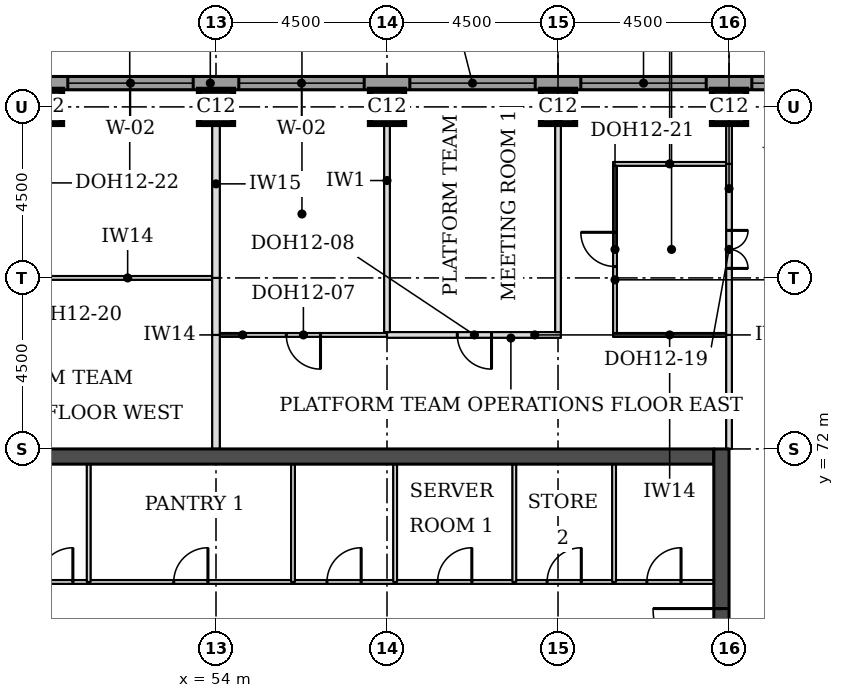
"""IFC4 building model, lengths in metres.
Left out: names, types, materials, properties, quantities, classifications, styles, units other than length and angle.
Written with IfcOpenShell. Run it as: python <this file> out.ifc"""

import sys

from ifc_helpers import new_model, si_unit, direction, frame, frame_2d, origin, origin_2d, place, context, subcontext, project, spatial, rectangle, extrude, element, fill, save


model = new_model("IFC4")
c1 = context("Model", 3, precision=1e-05, world=origin(), true_north=direction((0.0, 1.0)))
c2 = subcontext(c1, "Body", "Model", "MODEL_VIEW")
j1 = project(units=[si_unit("LENGTHUNIT", "METRE"), si_unit("PLANEANGLEUNIT", "RADIAN")], contexts=[c1])
p1 = place(None, origin())
s1 = spatial("IfcSite", under=j1, at=p1, CompositionType="ELEMENT")
p2 = place(p1, origin())
s2 = spatial("IfcBuilding", under=s1, at=p2, CompositionType="ELEMENT")
p3 = place(p2, frame((0.0, 0.0, 252.6)))
s3 = spatial("IfcBuildingStorey", under=s2, at=p3, CompositionType="ELEMENT", Elevation=252.6)
for number, where, z_axis, x_axis in (
    (1, (49.5, 81.0, 0.0), (0.0, 0.0, 1.0), (1.0, 0.0, 0.0)),
    (2, (54.0, 81.0, 0.0), (0.0, 0.0, 1.0), (1.0, 0.0, 0.0)),
    (3, (58.5, 81.0, 0.0), (0.0, 0.0, 1.0), (1.0, 0.0, 0.0)),
    (4, (63.0, 81.0, 0.0), (0.0, 0.0, 1.0), (1.0, 0.0, 0.0)),
    (5, (67.5, 81.0, 0.0), (0.0, 0.0, 1.0), (1.0, 0.0, 0.0)),
):
    element("IfcColumn", number, at=place(p3, frame(where, z_axis=z_axis, x_axis=x_axis)), inside=s3, PredefinedType="COLUMN", context=c2, shape_type="SweptSolid", body=[
        extrude(rectangle(XDim=0.9, YDim=0.9, at=origin_2d()), origin(), (0.0, 0.0, 1.0), 3.7),
    ])
p4 = place(p3, frame((45.4, 71.8, 0.0), z_axis=(0.0, 0.0, 1.0), x_axis=(1.0, 0.0, 0.0)))
e6 = element("IfcWall", 6, at=p4, inside=s3, PredefinedType="SHEAR", context=c2, shape_type="SweptSolid", body=[
    extrude(rectangle(XDim=21.7, YDim=0.4, at=frame_2d((10.85, 0.0))), origin(), (0.0, 0.0, 1.0), 3.7),
])
p5 = place(p3, frame((67.3, 49.5, 0.0), z_axis=(0.0, 0.0, 1.0), x_axis=(0.0, 1.0, 0.0)))
e7 = element("IfcWall", 7, at=p5, inside=s3, PredefinedType="SHEAR", context=c2, shape_type="SweptSolid", body=[
    extrude(rectangle(XDim=22.5, YDim=0.4, at=frame_2d((11.25, 0.0))), origin(), (0.0, 0.0, 1.0), 3.7),
])
p6 = place(p5, frame((4.2, 0.0, 0.0)))
e8 = element("IfcOpeningElement", 8, at=p6, cuts=e7, PredefinedType="OPENING", context=c2, shape_type="SweptSolid", body=[
    extrude(rectangle(XDim=1.8, YDim=2.1, at=frame_2d((0.9, 1.05))), frame((0.0, 0.21, 0.0), z_axis=(0.0, -1.0, 0.0), x_axis=(1.0, 0.0, 0.0)), (0.0, 0.0, 1.0), 0.42),
])
p7 = place(p5, frame((6.9, 0.0, 0.0)))
e9 = element("IfcOpeningElement", 9, at=p7, cuts=e7, PredefinedType="OPENING", context=c2, shape_type="SweptSolid", body=[
    extrude(rectangle(XDim=1.1, YDim=2.1, at=frame_2d((0.55, 1.05))), frame((0.0, 0.21, 0.0), z_axis=(0.0, -1.0, 0.0), x_axis=(1.0, 0.0, 0.0)), (0.0, 0.0, 1.0), 0.42),
])
p8 = place(p5, frame((13.6, 0.0, 0.0)))
e10 = element("IfcOpeningElement", 10, at=p8, cuts=e7, PredefinedType="OPENING", context=c2, shape_type="SweptSolid", body=[
    extrude(rectangle(XDim=1.1, YDim=2.1, at=frame_2d((0.55, 1.05))), frame((0.0, 0.21, 0.0), z_axis=(0.0, -1.0, 0.0), x_axis=(1.0, 0.0, 0.0)), (0.0, 0.0, 1.0), 0.42),
])
p9 = place(p5, frame((16.5, 0.0, 0.0)))
e11 = element("IfcOpeningElement", 11, at=p9, cuts=e7, PredefinedType="OPENING", context=c2, shape_type="SweptSolid", body=[
    extrude(rectangle(XDim=1.8, YDim=2.1, at=frame_2d((0.9, 1.05))), frame((0.0, 0.21, 0.0), z_axis=(0.0, -1.0, 0.0), x_axis=(1.0, 0.0, 0.0)), (0.0, 0.0, 1.0), 0.42),
])
p10 = place(p3, frame((72.331, 81.625, 0.0), z_axis=(0.0, 0.0, 1.0), x_axis=(-1.0, 0.0, 0.0)))
e12 = element("IfcWall", 12, at=p10, inside=s3, PredefinedType="STANDARD", context=c2, shape_type="SweptSolid", body=[
    extrude(rectangle(XDim=32.163, YDim=0.35, at=frame_2d((16.081, 0.0))), origin(), (0.0, 0.0, 1.0), 3.525),
])
p11 = place(p10, frame((0.931, 0.0, 0.9)))
e13 = element("IfcOpeningElement", 13, at=p11, cuts=e12, PredefinedType="OPENING", context=c2, shape_type="SweptSolid", body=[
    extrude(rectangle(XDim=3.3, YDim=1.9, at=frame_2d((1.65, 0.95))), frame((0.0, 0.185, 0.0), z_axis=(0.0, -1.0, 0.0), x_axis=(1.0, 0.0, 0.0)), (0.0, 0.0, 1.0), 0.37),
])
p12 = place(p10, frame((5.431, 0.0, 0.9)))
e14 = element("IfcOpeningElement", 14, at=p12, cuts=e12, PredefinedType="OPENING", context=c2, shape_type="SweptSolid", body=[
    extrude(rectangle(XDim=3.3, YDim=1.9, at=frame_2d((1.65, 0.95))), frame((0.0, 0.185, 0.0), z_axis=(0.0, -1.0, 0.0), x_axis=(1.0, 0.0, 0.0)), (0.0, 0.0, 1.0), 0.37),
])
p13 = place(p10, frame((9.931, 0.0, 0.9)))
e15 = element("IfcOpeningElement", 15, at=p13, cuts=e12, PredefinedType="OPENING", context=c2, shape_type="SweptSolid", body=[
    extrude(rectangle(XDim=3.3, YDim=1.9, at=frame_2d((1.65, 0.95))), frame((0.0, 0.185, 0.0), z_axis=(0.0, -1.0, 0.0), x_axis=(1.0, 0.0, 0.0)), (0.0, 0.0, 1.0), 0.37),
])
p14 = place(p10, frame((14.431, 0.0, 0.9)))
e16 = element("IfcOpeningElement", 16, at=p14, cuts=e12, PredefinedType="OPENING", context=c2, shape_type="SweptSolid", body=[
    extrude(rectangle(XDim=3.3, YDim=1.9, at=frame_2d((1.65, 0.95))), frame((0.0, 0.185, 0.0), z_axis=(0.0, -1.0, 0.0), x_axis=(1.0, 0.0, 0.0)), (0.0, 0.0, 1.0), 0.37),
])
p15 = place(p10, frame((18.931, 0.0, 0.9)))
e17 = element("IfcOpeningElement", 17, at=p15, cuts=e12, PredefinedType="OPENING", context=c2, shape_type="SweptSolid", body=[
    extrude(rectangle(XDim=3.3, YDim=1.9, at=frame_2d((1.65, 0.95))), frame((0.0, 0.185, 0.0), z_axis=(0.0, -1.0, 0.0), x_axis=(1.0, 0.0, 0.0)), (0.0, 0.0, 1.0), 0.37),
])
p16 = place(p10, frame((23.431, 0.0, 0.9)))
e18 = element("IfcOpeningElement", 18, at=p16, cuts=e12, PredefinedType="OPENING", context=c2, shape_type="SweptSolid", body=[
    extrude(rectangle(XDim=3.3, YDim=1.9, at=frame_2d((1.65, 0.95))), frame((0.0, 0.185, 0.0), z_axis=(0.0, -1.0, 0.0), x_axis=(1.0, 0.0, 0.0)), (0.0, 0.0, 1.0), 0.37),
])
p17 = place(p10, frame((27.931, 0.0, 0.9)))
e19 = element("IfcOpeningElement", 19, at=p17, cuts=e12, PredefinedType="OPENING", context=c2, shape_type="SweptSolid", body=[
    extrude(rectangle(XDim=3.3, YDim=1.9, at=frame_2d((1.65, 0.95))), frame((0.0, 0.185, 0.0), z_axis=(0.0, -1.0, 0.0), x_axis=(1.0, 0.0, 0.0)), (0.0, 0.0, 1.0), 0.37),
])
p18 = place(p3, frame((54.1, 75.0, 0.0), z_axis=(0.0, 0.0, 1.0), x_axis=(1.0, 0.0, 0.0)))
e20 = element("IfcWall", 20, at=p18, inside=s3, PredefinedType="PARTITIONING", context=c2, shape_type="SweptSolid", body=[
    extrude(rectangle(XDim=4.4, YDim=0.1, at=frame_2d((2.2, 0.0))), origin(), (0.0, 0.0, 1.0), 3.55),
])
p19 = place(p18, frame((1.75, 0.0, 0.0)))
e21 = element("IfcOpeningElement", 21, at=p19, cuts=e20, PredefinedType="OPENING", context=c2, shape_type="SweptSolid", body=[
    extrude(rectangle(XDim=0.9, YDim=2.1, at=frame_2d((0.45, 1.05))), frame((0.0, 0.06, 0.0), z_axis=(0.0, -1.0, 0.0), x_axis=(1.0, 0.0, 0.0)), (0.0, 0.0, 1.0), 0.12),
])
p20 = place(p3, frame((58.5, 75.0, 0.0), z_axis=(0.0, 0.0, 1.0), x_axis=(1.0, 0.0, 0.0)))
e22 = element("IfcWall", 22, at=p20, inside=s3, PredefinedType="PARTITIONING", context=c2, shape_type="SweptSolid", body=[
    extrude(rectangle(XDim=4.575, YDim=0.15, at=frame_2d((2.288, 0.0))), origin(), (0.0, 0.0, 1.0), 3.55),
])
p21 = place(p20, frame((1.85, 0.0, 0.0)))
e23 = element("IfcOpeningElement", 23, at=p21, cuts=e22, PredefinedType="OPENING", context=c2, shape_type="SweptSolid", body=[
    extrude(rectangle(XDim=0.9, YDim=2.1, at=frame_2d((0.45, 1.05))), frame((0.0, 0.085, 0.0), z_axis=(0.0, -1.0, 0.0), x_axis=(1.0, 0.0, 0.0)), (0.0, 0.0, 1.0), 0.17),
])
p22 = place(p3, frame((64.45, 75.0, 0.0), z_axis=(0.0, 0.0, 1.0), x_axis=(1.0, 0.0, 0.0)))
e24 = element("IfcWall", 24, at=p22, inside=s3, PredefinedType="PARTITIONING", context=c2, shape_type="SweptSolid", body=[
    extrude(rectangle(XDim=2.975, YDim=0.1, at=frame_2d((1.488, 0.0))), origin(), (0.0, 0.0, 1.0), 3.55),
])
p23 = place(p3, frame((49.45, 76.5, 0.0), z_axis=(0.0, 0.0, 1.0), x_axis=(1.0, 0.0, 0.0)))
e25 = element("IfcWall", 25, at=p23, inside=s3, PredefinedType="PARTITIONING", context=c2, shape_type="SweptSolid", body=[
    extrude(rectangle(XDim=4.45, YDim=0.1, at=frame_2d((2.225, 0.0))), origin(), (0.0, 0.0, 1.0), 3.55),
])
p24 = place(p3, frame((64.45, 79.5, 0.0), z_axis=(0.0, 0.0, 1.0), x_axis=(1.0, 0.0, 0.0)))
e26 = element("IfcWall", 26, at=p24, inside=s3, PredefinedType="PARTITIONING", context=c2, shape_type="SweptSolid", body=[
    extrude(rectangle(XDim=2.975, YDim=0.1, at=frame_2d((1.488, 0.0))), origin(), (0.0, 0.0, 1.0), 3.55),
])
p25 = place(p3, frame((54.0, 72.0, 0.0), z_axis=(0.0, 0.0, 1.0), x_axis=(0.0, 1.0, 0.0)))
e27 = element("IfcWall", 27, at=p25, inside=s3, PredefinedType="PARTITIONING", context=c2, shape_type="SweptSolid", body=[
    extrude(rectangle(XDim=3.0, YDim=0.2, at=frame_2d((1.5, 0.0))), origin(), (0.0, 0.0, 1.0), 3.55),
])
p26 = place(p3, frame((67.5, 72.0, 0.0), z_axis=(0.0, 0.0, 1.0), x_axis=(0.0, 1.0, 0.0)))
e28 = element("IfcWall", 28, at=p26, inside=s3, PredefinedType="PARTITIONING", context=c2, shape_type="SweptSolid", body=[
    extrude(rectangle(XDim=3.0, YDim=0.15, at=frame_2d((1.5, 0.0))), origin(), (0.0, 0.0, 1.0), 3.022),
])
p27 = place(p3, frame((54.0, 75.0, 0.0), z_axis=(0.0, 0.0, 1.0), x_axis=(0.0, 1.0, 0.0)))
e29 = element("IfcWall", 29, at=p27, inside=s3, PredefinedType="PARTITIONING", context=c2, shape_type="SweptSolid", body=[
    extrude(rectangle(XDim=1.5, YDim=0.2, at=frame_2d((0.75, 0.0))), origin(), (0.0, 0.0, 1.0), 3.55),
])
p28 = place(p3, frame((67.5, 75.0, 0.0), z_axis=(0.0, 0.0, 1.0), x_axis=(0.0, 1.0, 0.0)))
e30 = element("IfcWall", 30, at=p28, inside=s3, PredefinedType="PARTITIONING", context=c2, shape_type="SweptSolid", body=[
    extrude(rectangle(XDim=4.5, YDim=0.15, at=frame_2d((2.25, 0.0))), origin(), (0.0, 0.0, 1.0), 3.022),
])
p29 = place(p28, frame((1.75, 0.0, 0.0)))
e31 = element("IfcOpeningElement", 31, at=p29, cuts=e30, PredefinedType="OPENING", context=c2, shape_type="SweptSolid", body=[
    extrude(rectangle(XDim=1.0, YDim=2.1, at=frame_2d((0.5, 1.05))), frame((0.0, 0.085, 0.0), z_axis=(0.0, -1.0, 0.0), x_axis=(1.0, 0.0, 0.0)), (0.0, 0.0, 1.0), 0.17),
])
p30 = place(p3, frame((64.5, 75.05, 0.0), z_axis=(0.0, 0.0, 1.0), x_axis=(0.0, 1.0, 0.0)))
e32 = element("IfcWall", 32, at=p30, inside=s3, PredefinedType="PARTITIONING", context=c2, shape_type="SweptSolid", body=[
    extrude(rectangle(XDim=4.4, YDim=0.1, at=frame_2d((2.2, 0.0))), origin(), (0.0, 0.0, 1.0), 3.55),
])
p31 = place(p30, frame((1.75, 0.0, 0.0)))
e33 = element("IfcOpeningElement", 33, at=p31, cuts=e32, PredefinedType="OPENING", context=c2, shape_type="SweptSolid", body=[
    extrude(rectangle(XDim=0.9, YDim=2.1, at=frame_2d((0.45, 1.05))), frame((0.0, 0.06, 0.0), z_axis=(0.0, -1.0, 0.0), x_axis=(1.0, 0.0, 0.0)), (0.0, 0.0, 1.0), 0.12),
])
for number, where, z_axis, x_axis in (
    (34, (58.5, 75.075, 0.0), (0.0, 0.0, 1.0), (0.0, 1.0, 0.0)),
    (35, (63.0, 75.075, 0.0), (0.0, 0.0, 1.0), (0.0, 1.0, 0.0)),
):
    element("IfcWall", number, at=place(p3, frame(where, z_axis=z_axis, x_axis=x_axis)), inside=s3, PredefinedType="PARTITIONING", context=c2, shape_type="SweptSolid", body=[
        extrude(rectangle(XDim=6.375, YDim=0.15, at=frame_2d((3.188, 0.0))), origin(), (0.0, 0.0, 1.0), 3.55),
    ])
p32 = place(p3, frame((54.0, 76.5, 0.0), z_axis=(0.0, 0.0, 1.0), x_axis=(0.0, 1.0, 0.0)))
e36 = element("IfcWall", 36, at=p32, inside=s3, PredefinedType="PARTITIONING", context=c2, shape_type="SweptSolid", body=[
    extrude(rectangle(XDim=4.95, YDim=0.2, at=frame_2d((2.475, 0.0))), origin(), (0.0, 0.0, 1.0), 3.55),
])
p33 = place(p3, frame((67.5, 79.5, 0.0), z_axis=(0.0, 0.0, 1.0), x_axis=(0.0, 1.0, 0.0)))
e37 = element("IfcWall", 37, at=p33, inside=s3, PredefinedType="PARTITIONING", context=c2, shape_type="SweptSolid", body=[
    extrude(rectangle(XDim=1.95, YDim=0.15, at=frame_2d((0.975, 0.0))), origin(), (0.0, 0.0, 1.0), 3.022),
])
p34 = place(p3, frame((45.4, 68.5, 0.0), z_axis=(0.0, 0.0, 1.0), x_axis=(1.0, 0.0, 0.0)))
e38 = element("IfcWall", 38, at=p34, inside=s3, PredefinedType="PARTITIONING", context=c2, shape_type="SweptSolid", body=[
    extrude(rectangle(XDim=21.7, YDim=0.1, at=frame_2d((10.85, 0.0))), origin(), (0.0, 0.0, 1.0), 3.55),
])
p35 = place(p34, frame((19.938, 0.0, 0.0)))
e39 = element("IfcOpeningElement", 39, at=p35, cuts=e38, PredefinedType="OPENING", context=c2, shape_type="SweptSolid", body=[
    extrude(rectangle(XDim=0.9, YDim=2.1, at=frame_2d((0.45, 1.05))), frame((0.0, 0.06, 0.0), z_axis=(0.0, -1.0, 0.0), x_axis=(1.0, 0.0, 0.0)), (0.0, 0.0, 1.0), 0.12),
])
p36 = place(p34, frame((17.312, 0.0, 0.0)))
e40 = element("IfcOpeningElement", 40, at=p36, cuts=e38, PredefinedType="OPENING", context=c2, shape_type="SweptSolid", body=[
    extrude(rectangle(XDim=0.9, YDim=2.1, at=frame_2d((0.45, 1.05))), frame((0.0, 0.06, 0.0), z_axis=(0.0, -1.0, 0.0), x_axis=(1.0, 0.0, 0.0)), (0.0, 0.0, 1.0), 0.12),
])
p37 = place(p34, frame((0.442, 0.0, 0.0)))
e41 = element("IfcOpeningElement", 41, at=p37, cuts=e38, PredefinedType="OPENING", context=c2, shape_type="SweptSolid", body=[
    extrude(rectangle(XDim=0.9, YDim=2.1, at=frame_2d((0.45, 1.05))), frame((0.0, 0.06, 0.0), z_axis=(0.0, -1.0, 0.0), x_axis=(1.0, 0.0, 0.0)), (0.0, 0.0, 1.0), 0.12),
])
p38 = place(p34, frame((2.201, 0.0, 0.0)))
e42 = element("IfcOpeningElement", 42, at=p38, cuts=e38, PredefinedType="OPENING", context=c2, shape_type="SweptSolid", body=[
    extrude(rectangle(XDim=0.9, YDim=2.1, at=frame_2d((0.45, 1.05))), frame((0.0, 0.06, 0.0), z_axis=(0.0, -1.0, 0.0), x_axis=(1.0, 0.0, 0.0)), (0.0, 0.0, 1.0), 0.12),
])
p39 = place(p34, frame((3.934, 0.0, 0.0)))
e43 = element("IfcOpeningElement", 43, at=p39, cuts=e38, PredefinedType="OPENING", context=c2, shape_type="SweptSolid", body=[
    extrude(rectangle(XDim=0.9, YDim=2.1, at=frame_2d((0.45, 1.05))), frame((0.0, 0.06, 0.0), z_axis=(0.0, -1.0, 0.0), x_axis=(1.0, 0.0, 0.0)), (0.0, 0.0, 1.0), 0.12),
])
p40 = place(p34, frame((14.432, 0.0, 0.0)))
e44 = element("IfcOpeningElement", 44, at=p40, cuts=e38, PredefinedType="OPENING", context=c2, shape_type="SweptSolid", body=[
    extrude(rectangle(XDim=0.9, YDim=2.1, at=frame_2d((0.45, 1.05))), frame((0.0, 0.06, 0.0), z_axis=(0.0, -1.0, 0.0), x_axis=(1.0, 0.0, 0.0)), (0.0, 0.0, 1.0), 0.12),
])
p41 = place(p34, frame((11.52, 0.0, 0.0)))
e45 = element("IfcOpeningElement", 45, at=p41, cuts=e38, PredefinedType="OPENING", context=c2, shape_type="SweptSolid", body=[
    extrude(rectangle(XDim=0.9, YDim=2.1, at=frame_2d((0.45, 1.05))), frame((0.0, 0.06, 0.0), z_axis=(0.0, -1.0, 0.0), x_axis=(1.0, 0.0, 0.0)), (0.0, 0.0, 1.0), 0.12),
])
p42 = place(p34, frame((7.488, 0.0, 0.0)))
e46 = element("IfcOpeningElement", 46, at=p42, cuts=e38, PredefinedType="OPENING", context=c2, shape_type="SweptSolid", body=[
    extrude(rectangle(XDim=0.9, YDim=2.1, at=frame_2d((0.45, 1.05))), frame((0.0, 0.06, 0.0), z_axis=(0.0, -1.0, 0.0), x_axis=(1.0, 0.0, 0.0)), (0.0, 0.0, 1.0), 0.12),
])
for number, where, z_axis, x_axis in (
    (47, (50.65, 68.5, 0.0), (0.0, 0.0, 1.0), (0.0, 1.0, 0.0)),
    (48, (56.026, 68.5, 0.0), (0.0, 0.0, 1.0), (0.0, 1.0, 0.0)),
    (49, (58.714, 68.5, 0.0), (0.0, 0.0, 1.0), (0.0, 1.0, 0.0)),
    (50, (61.85, 68.5, 0.0), (0.0, 0.0, 1.0), (0.0, 1.0, 0.0)),
    (51, (64.475, 68.5, 0.0), (0.0, 0.0, 1.0), (0.0, 1.0, 0.0)),
):
    element("IfcWall", number, at=place(p3, frame(where, z_axis=z_axis, x_axis=x_axis)), inside=s3, PredefinedType="PARTITIONING", context=c2, shape_type="SweptSolid", body=[
        extrude(rectangle(XDim=3.1, YDim=0.1, at=frame_2d((1.55, 0.0))), origin(), (0.0, 0.0, 1.0), 3.55),
    ])
p43 = place(p11, origin())
e52 = element("IfcWindow", 52, at=p43, inside=s3, PartitioningType="SINGLE_PANEL", PredefinedType="WINDOW", context=c2, shape_type="SweptSolid", body=[
    extrude(rectangle(XDim=3.3, YDim=1.9, at=frame_2d((1.65, 0.95))), frame((0.0, 0.085, 0.0), z_axis=(0.0, -1.0, 0.0), x_axis=(1.0, 0.0, 0.0)), (0.0, 0.0, 1.0), 0.06),
])
fill(e13, e52)
p44 = place(p12, origin())
e53 = element("IfcWindow", 53, at=p44, inside=s3, PartitioningType="SINGLE_PANEL", PredefinedType="WINDOW", context=c2, shape_type="SweptSolid", body=[
    extrude(rectangle(XDim=3.3, YDim=1.9, at=frame_2d((1.65, 0.95))), frame((0.0, 0.085, 0.0), z_axis=(0.0, -1.0, 0.0), x_axis=(1.0, 0.0, 0.0)), (0.0, 0.0, 1.0), 0.06),
])
fill(e14, e53)
p45 = place(p13, origin())
e54 = element("IfcWindow", 54, at=p45, inside=s3, PartitioningType="SINGLE_PANEL", PredefinedType="WINDOW", context=c2, shape_type="SweptSolid", body=[
    extrude(rectangle(XDim=3.3, YDim=1.9, at=frame_2d((1.65, 0.95))), frame((0.0, 0.085, 0.0), z_axis=(0.0, -1.0, 0.0), x_axis=(1.0, 0.0, 0.0)), (0.0, 0.0, 1.0), 0.06),
])
fill(e15, e54)
p46 = place(p14, origin())
e55 = element("IfcWindow", 55, at=p46, inside=s3, PartitioningType="SINGLE_PANEL", PredefinedType="WINDOW", context=c2, shape_type="SweptSolid", body=[
    extrude(rectangle(XDim=3.3, YDim=1.9, at=frame_2d((1.65, 0.95))), frame((0.0, 0.085, 0.0), z_axis=(0.0, -1.0, 0.0), x_axis=(1.0, 0.0, 0.0)), (0.0, 0.0, 1.0), 0.06),
])
fill(e16, e55)
p47 = place(p15, origin())
e56 = element("IfcWindow", 56, at=p47, inside=s3, PartitioningType="SINGLE_PANEL", PredefinedType="WINDOW", context=c2, shape_type="SweptSolid", body=[
    extrude(rectangle(XDim=3.3, YDim=1.9, at=frame_2d((1.65, 0.95))), frame((0.0, 0.085, 0.0), z_axis=(0.0, -1.0, 0.0), x_axis=(1.0, 0.0, 0.0)), (0.0, 0.0, 1.0), 0.06),
])
fill(e17, e56)
p48 = place(p29, frame((1.0, 0.0, 0.0), z_axis=(0.0, 0.0, 1.0), x_axis=(-1.0, 0.0, 0.0)))
e57 = element("IfcDoor", 57, at=p48, inside=s3, OperationType="DOUBLE_DOOR_SINGLE_SWING", PredefinedType="DOOR", context=c2, shape_type="SweptSolid", body=[
    extrude(rectangle(XDim=1.0, YDim=2.1, at=frame_2d((0.5, 1.05))), frame((0.0, 0.025, 0.0), z_axis=(0.0, -1.0, 0.0), x_axis=(1.0, 0.0, 0.0)), (0.0, 0.0, 1.0), 0.05),
])
fill(e31, e57)
p49 = place(p31, origin())
e58 = element("IfcDoor", 58, at=p49, inside=s3, OperationType="SINGLE_SWING_RIGHT", PredefinedType="DOOR", context=c2, shape_type="SweptSolid", body=[
    extrude(rectangle(XDim=0.9, YDim=2.1, at=frame_2d((0.45, 1.05))), frame((0.0, 0.025, 0.0), z_axis=(0.0, -1.0, 0.0), x_axis=(1.0, 0.0, 0.0)), (0.0, 0.0, 1.0), 0.05),
])
fill(e33, e58)
p50 = place(p19, frame((0.9, 0.0, 0.0), z_axis=(0.0, 0.0, 1.0), x_axis=(-1.0, 0.0, 0.0)))
e59 = element("IfcDoor", 59, at=p50, inside=s3, OperationType="SINGLE_SWING_LEFT", PredefinedType="DOOR", context=c2, shape_type="SweptSolid", body=[
    extrude(rectangle(XDim=0.9, YDim=2.1, at=frame_2d((0.45, 1.05))), frame((0.0, 0.025, 0.0), z_axis=(0.0, -1.0, 0.0), x_axis=(1.0, 0.0, 0.0)), (0.0, 0.0, 1.0), 0.05),
])
fill(e21, e59)
p51 = place(p21, frame((0.9, 0.0, 0.0), z_axis=(0.0, 0.0, 1.0), x_axis=(-1.0, 0.0, 0.0)))
e60 = element("IfcDoor", 60, at=p51, inside=s3, OperationType="SINGLE_SWING_LEFT", PredefinedType="DOOR", context=c2, shape_type="SweptSolid", body=[
    extrude(rectangle(XDim=0.9, YDim=2.1, at=frame_2d((0.45, 1.05))), frame((0.0, 0.025, 0.0), z_axis=(0.0, -1.0, 0.0), x_axis=(1.0, 0.0, 0.0)), (0.0, 0.0, 1.0), 0.05),
])
fill(e23, e60)
p52 = place(p9, origin())
e61 = element("IfcDoor", 61, at=p52, inside=s3, OperationType="SINGLE_SWING_RIGHT", PredefinedType="DOOR", context=c2, shape_type="SweptSolid", body=[
    extrude(rectangle(XDim=1.8, YDim=2.1, at=frame_2d((0.9, 1.05))), frame((0.0, 0.025, 0.0), z_axis=(0.0, -1.0, 0.0), x_axis=(1.0, 0.0, 0.0)), (0.0, 0.0, 1.0), 0.05),
])
fill(e11, e61)
p53 = place(p35, origin())
e62 = element("IfcDoor", 62, at=p53, inside=s3, OperationType="SINGLE_SWING_RIGHT", PredefinedType="DOOR", context=c2, shape_type="SweptSolid", body=[
    extrude(rectangle(XDim=0.9, YDim=2.1, at=frame_2d((0.45, 1.05))), frame((0.0, 0.025, 0.0), z_axis=(0.0, -1.0, 0.0), x_axis=(1.0, 0.0, 0.0)), (0.0, 0.0, 1.0), 0.05),
])
fill(e39, e62)
p54 = place(p36, origin())
e63 = element("IfcDoor", 63, at=p54, inside=s3, OperationType="SINGLE_SWING_RIGHT", PredefinedType="DOOR", context=c2, shape_type="SweptSolid", body=[
    extrude(rectangle(XDim=0.9, YDim=2.1, at=frame_2d((0.45, 1.05))), frame((0.0, 0.025, 0.0), z_axis=(0.0, -1.0, 0.0), x_axis=(1.0, 0.0, 0.0)), (0.0, 0.0, 1.0), 0.05),
])
fill(e40, e63)
p55 = place(p39, origin())
e64 = element("IfcDoor", 64, at=p55, inside=s3, OperationType="SINGLE_SWING_RIGHT", PredefinedType="DOOR", context=c2, shape_type="SweptSolid", body=[
    extrude(rectangle(XDim=0.9, YDim=2.1, at=frame_2d((0.45, 1.05))), frame((0.0, 0.025, 0.0), z_axis=(0.0, -1.0, 0.0), x_axis=(1.0, 0.0, 0.0)), (0.0, 0.0, 1.0), 0.05),
])
fill(e43, e64)
p56 = place(p40, origin())
e65 = element("IfcDoor", 65, at=p56, inside=s3, OperationType="SINGLE_SWING_RIGHT", PredefinedType="DOOR", context=c2, shape_type="SweptSolid", body=[
    extrude(rectangle(XDim=0.9, YDim=2.1, at=frame_2d((0.45, 1.05))), frame((0.0, 0.025, 0.0), z_axis=(0.0, -1.0, 0.0), x_axis=(1.0, 0.0, 0.0)), (0.0, 0.0, 1.0), 0.05),
])
fill(e44, e65)
p57 = place(p41, origin())
e66 = element("IfcDoor", 66, at=p57, inside=s3, OperationType="SINGLE_SWING_RIGHT", PredefinedType="DOOR", context=c2, shape_type="SweptSolid", body=[
    extrude(rectangle(XDim=0.9, YDim=2.1, at=frame_2d((0.45, 1.05))), frame((0.0, 0.025, 0.0), z_axis=(0.0, -1.0, 0.0), x_axis=(1.0, 0.0, 0.0)), (0.0, 0.0, 1.0), 0.05),
])
fill(e45, e66)
p58 = place(p42, origin())
e67 = element("IfcDoor", 67, at=p58, inside=s3, OperationType="SINGLE_SWING_RIGHT", PredefinedType="DOOR", context=c2, shape_type="SweptSolid", body=[
    extrude(rectangle(XDim=0.9, YDim=2.1, at=frame_2d((0.45, 1.05))), frame((0.0, 0.025, 0.0), z_axis=(0.0, -1.0, 0.0), x_axis=(1.0, 0.0, 0.0)), (0.0, 0.0, 1.0), 0.05),
])
fill(e46, e67)
save(model, sys.argv[1])
